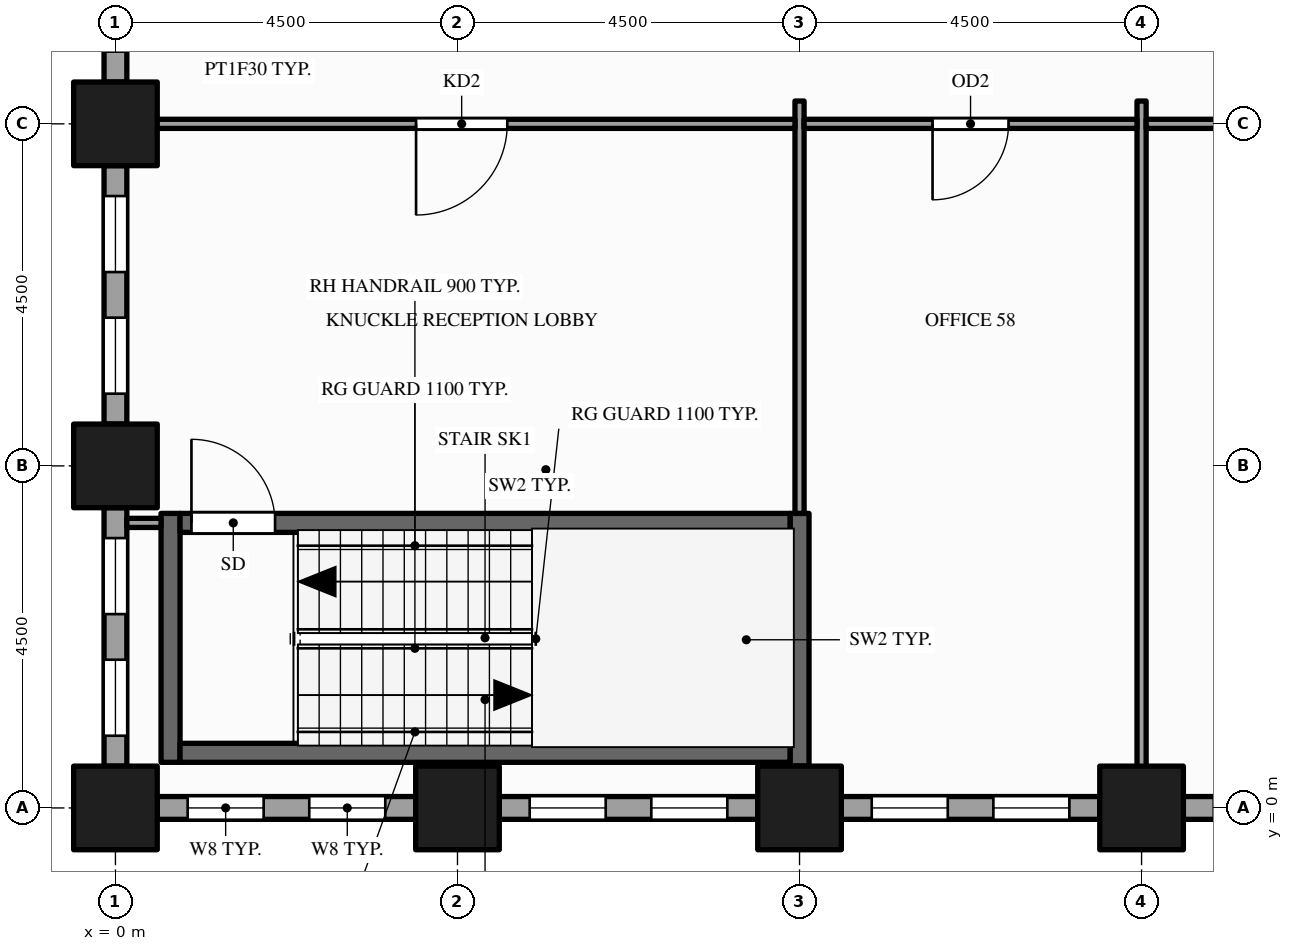
"""IFC4 building model, lengths in metres.
Left out: names, types, materials, properties, quantities, classifications, styles, units other than length and angle.
Written with IfcOpenShell. Run it as: python <this file> out.ifc"""

import sys

from ifc_helpers import new_model, si_unit, direction, frame, frame_2d, origin, origin_2d, place, context, subcontext, project, spatial, rectangle, hollow_rectangle, extrude, element, fill, save


model = new_model("IFC4")
c1 = context("Model", 3, precision=1e-05, world=origin(), true_north=direction((0.0, 1.0)))
c2 = subcontext(c1, "Body", "Model", "MODEL_VIEW")
j1 = project(units=[si_unit("LENGTHUNIT", "METRE"), si_unit("PLANEANGLEUNIT", "RADIAN")], contexts=[c1])
p1 = place(None, origin())
s1 = spatial("IfcSite", under=j1, at=p1, CompositionType="ELEMENT")
p2 = place(p1, origin())
s2 = spatial("IfcBuilding", under=s1, at=p2, CompositionType="ELEMENT")
p3 = place(p2, frame((0.0, 0.0, 29.0)))
s3 = spatial("IfcBuildingStorey", under=s2, at=p3, CompositionType="ELEMENT", Elevation=29.0)
for number, where, z_axis, x_axis in (
    (1, (0.0, 0.0, -0.15), (0.0, 0.0, 1.0), (1.0, 0.0, 0.0)),
    (2, (0.0, 4.5, -0.15), (0.0, 0.0, 1.0), (1.0, 0.0, 0.0)),
    (3, (0.0, 9.0, -0.15), (0.0, 0.0, 1.0), (1.0, 0.0, 0.0)),
    (4, (4.5, 0.0, -0.15), (0.0, 0.0, 1.0), (1.0, 0.0, 0.0)),
    (5, (9.0, 0.0, -0.15), (0.0, 0.0, 1.0), (1.0, 0.0, 0.0)),
    (6, (13.5, 0.0, -0.15), (0.0, 0.0, 1.0), (1.0, 0.0, 0.0)),
):
    element("IfcColumn", number, at=place(p3, frame(where, z_axis=z_axis, x_axis=x_axis)), inside=s3, PredefinedType="COLUMN", context=c2, shape_type="SweptSolid", body=[
        extrude(hollow_rectangle(XDim=1.1, YDim=1.1, WallThickness=0.06, at=origin_2d()), origin(), (0.0, 0.0, 1.0), 4.0),
    ])
p4 = place(p3, frame((0.55, 0.0, 0.0), z_axis=(0.0, 0.0, 1.0), x_axis=(1.0, 0.0, 0.0)))
e7 = element("IfcWall", 7, at=p4, inside=s3, PredefinedType="STANDARD", context=c2, shape_type="SweptSolid", body=[
    extrude(rectangle(XDim=3.4, YDim=0.3, at=frame_2d((1.7, 0.0))), origin(), (0.0, 0.0, 1.0), 3.144),
])
p5 = place(p4, frame((0.4, 0.0, 0.9)))
e8 = element("IfcOpeningElement", 8, at=p5, cuts=e7, PredefinedType="OPENING", context=c2, shape_type="SweptSolid", body=[
    extrude(rectangle(XDim=1.0, YDim=2.0, at=frame_2d((0.5, 1.0))), frame((0.0, 0.16, 0.0), z_axis=(0.0, -1.0, 0.0), x_axis=(1.0, 0.0, 0.0)), (0.0, 0.0, 1.0), 0.32),
])
p6 = place(p4, frame((2.0, 0.0, 0.9)))
e9 = element("IfcOpeningElement", 9, at=p6, cuts=e7, PredefinedType="OPENING", context=c2, shape_type="SweptSolid", body=[
    extrude(rectangle(XDim=1.0, YDim=2.0, at=frame_2d((0.5, 1.0))), frame((0.0, 0.16, 0.0), z_axis=(0.0, -1.0, 0.0), x_axis=(1.0, 0.0, 0.0)), (0.0, 0.0, 1.0), 0.32),
])
p7 = place(p3, frame((5.05, 0.0, 0.0), z_axis=(0.0, 0.0, 1.0), x_axis=(1.0, 0.0, 0.0)))
e10 = element("IfcWall", 10, at=p7, inside=s3, PredefinedType="STANDARD", context=c2, shape_type="SweptSolid", body=[
    extrude(rectangle(XDim=3.4, YDim=0.3, at=frame_2d((1.7, 0.0))), origin(), (0.0, 0.0, 1.0), 3.144),
])
p8 = place(p7, frame((0.4, 0.0, 0.9)))
e11 = element("IfcOpeningElement", 11, at=p8, cuts=e10, PredefinedType="OPENING", context=c2, shape_type="SweptSolid", body=[
    extrude(rectangle(XDim=1.0, YDim=2.0, at=frame_2d((0.5, 1.0))), frame((0.0, 0.16, 0.0), z_axis=(0.0, -1.0, 0.0), x_axis=(1.0, 0.0, 0.0)), (0.0, 0.0, 1.0), 0.32),
])
p9 = place(p7, frame((2.0, 0.0, 0.9)))
e12 = element("IfcOpeningElement", 12, at=p9, cuts=e10, PredefinedType="OPENING", context=c2, shape_type="SweptSolid", body=[
    extrude(rectangle(XDim=1.0, YDim=2.0, at=frame_2d((0.5, 1.0))), frame((0.0, 0.16, 0.0), z_axis=(0.0, -1.0, 0.0), x_axis=(1.0, 0.0, 0.0)), (0.0, 0.0, 1.0), 0.32),
])
p10 = place(p3, frame((9.55, 0.0, 0.0), z_axis=(0.0, 0.0, 1.0), x_axis=(1.0, 0.0, 0.0)))
e13 = element("IfcWall", 13, at=p10, inside=s3, PredefinedType="STANDARD", context=c2, shape_type="SweptSolid", body=[
    extrude(rectangle(XDim=3.4, YDim=0.3, at=frame_2d((1.7, 0.0))), origin(), (0.0, 0.0, 1.0), 3.144),
])
p11 = place(p10, frame((0.4, 0.0, 0.9)))
e14 = element("IfcOpeningElement", 14, at=p11, cuts=e13, PredefinedType="OPENING", context=c2, shape_type="SweptSolid", body=[
    extrude(rectangle(XDim=1.0, YDim=2.0, at=frame_2d((0.5, 1.0))), frame((0.0, 0.16, 0.0), z_axis=(0.0, -1.0, 0.0), x_axis=(1.0, 0.0, 0.0)), (0.0, 0.0, 1.0), 0.32),
])
p12 = place(p10, frame((2.0, 0.0, 0.9)))
e15 = element("IfcOpeningElement", 15, at=p12, cuts=e13, PredefinedType="OPENING", context=c2, shape_type="SweptSolid", body=[
    extrude(rectangle(XDim=1.0, YDim=2.0, at=frame_2d((0.5, 1.0))), frame((0.0, 0.16, 0.0), z_axis=(0.0, -1.0, 0.0), x_axis=(1.0, 0.0, 0.0)), (0.0, 0.0, 1.0), 0.32),
])
p13 = place(p3, frame((14.05, 0.0, 0.0), z_axis=(0.0, 0.0, 1.0), x_axis=(1.0, 0.0, 0.0)))
e16 = element("IfcWall", 16, at=p13, inside=s3, PredefinedType="STANDARD", context=c2, shape_type="SweptSolid", body=[
    extrude(rectangle(XDim=3.4, YDim=0.3, at=frame_2d((1.7, 0.0))), origin(), (0.0, 0.0, 1.0), 3.144),
])
p14 = place(p13, frame((0.4, 0.0, 0.9)))
e17 = element("IfcOpeningElement", 17, at=p14, cuts=e16, PredefinedType="OPENING", context=c2, shape_type="SweptSolid", body=[
    extrude(rectangle(XDim=1.0, YDim=2.0, at=frame_2d((0.5, 1.0))), frame((0.0, 0.16, 0.0), z_axis=(0.0, -1.0, 0.0), x_axis=(1.0, 0.0, 0.0)), (0.0, 0.0, 1.0), 0.32),
])
p15 = place(p13, frame((2.0, 0.0, 0.9)))
e18 = element("IfcOpeningElement", 18, at=p15, cuts=e16, PredefinedType="OPENING", context=c2, shape_type="SweptSolid", body=[
    extrude(rectangle(XDim=1.0, YDim=2.0, at=frame_2d((0.5, 1.0))), frame((0.0, 0.16, 0.0), z_axis=(0.0, -1.0, 0.0), x_axis=(1.0, 0.0, 0.0)), (0.0, 0.0, 1.0), 0.32),
])
p16 = place(p3, frame((0.0, 12.95, 0.0), z_axis=(0.0, 0.0, 1.0), x_axis=(0.0, -1.0, 0.0)))
e19 = element("IfcWall", 19, at=p16, inside=s3, PredefinedType="STANDARD", context=c2, shape_type="SweptSolid", body=[
    extrude(rectangle(XDim=3.4, YDim=0.3, at=frame_2d((1.7, 0.0))), origin(), (0.0, 0.0, 1.0), 3.144),
])
p17 = place(p16, frame((0.4, 0.0, 0.9)))
e20 = element("IfcOpeningElement", 20, at=p17, cuts=e19, PredefinedType="OPENING", context=c2, shape_type="SweptSolid", body=[
    extrude(rectangle(XDim=1.0, YDim=2.0, at=frame_2d((0.5, 1.0))), frame((0.0, 0.16, 0.0), z_axis=(0.0, -1.0, 0.0), x_axis=(1.0, 0.0, 0.0)), (0.0, 0.0, 1.0), 0.32),
])
p18 = place(p16, frame((2.0, 0.0, 0.9)))
e21 = element("IfcOpeningElement", 21, at=p18, cuts=e19, PredefinedType="OPENING", context=c2, shape_type="SweptSolid", body=[
    extrude(rectangle(XDim=1.0, YDim=2.0, at=frame_2d((0.5, 1.0))), frame((0.0, 0.16, 0.0), z_axis=(0.0, -1.0, 0.0), x_axis=(1.0, 0.0, 0.0)), (0.0, 0.0, 1.0), 0.32),
])
p19 = place(p3, frame((0.0, 8.45, 0.0), z_axis=(0.0, 0.0, 1.0), x_axis=(0.0, -1.0, 0.0)))
e22 = element("IfcWall", 22, at=p19, inside=s3, PredefinedType="STANDARD", context=c2, shape_type="SweptSolid", body=[
    extrude(rectangle(XDim=3.4, YDim=0.3, at=frame_2d((1.7, 0.0))), origin(), (0.0, 0.0, 1.0), 3.144),
])
p20 = place(p19, frame((0.4, 0.0, 0.9)))
e23 = element("IfcOpeningElement", 23, at=p20, cuts=e22, PredefinedType="OPENING", context=c2, shape_type="SweptSolid", body=[
    extrude(rectangle(XDim=1.0, YDim=2.0, at=frame_2d((0.5, 1.0))), frame((0.0, 0.16, 0.0), z_axis=(0.0, -1.0, 0.0), x_axis=(1.0, 0.0, 0.0)), (0.0, 0.0, 1.0), 0.32),
])
p21 = place(p19, frame((2.0, 0.0, 0.9)))
e24 = element("IfcOpeningElement", 24, at=p21, cuts=e22, PredefinedType="OPENING", context=c2, shape_type="SweptSolid", body=[
    extrude(rectangle(XDim=1.0, YDim=2.0, at=frame_2d((0.5, 1.0))), frame((0.0, 0.16, 0.0), z_axis=(0.0, -1.0, 0.0), x_axis=(1.0, 0.0, 0.0)), (0.0, 0.0, 1.0), 0.32),
])
p22 = place(p3, frame((0.0, 3.95, 0.0), z_axis=(0.0, 0.0, 1.0), x_axis=(0.0, -1.0, 0.0)))
e25 = element("IfcWall", 25, at=p22, inside=s3, PredefinedType="STANDARD", context=c2, shape_type="SweptSolid", body=[
    extrude(rectangle(XDim=3.4, YDim=0.3, at=frame_2d((1.7, 0.0))), origin(), (0.0, 0.0, 1.0), 3.144),
])
p23 = place(p22, frame((0.4, 0.0, 0.9)))
e26 = element("IfcOpeningElement", 26, at=p23, cuts=e25, PredefinedType="OPENING", context=c2, shape_type="SweptSolid", body=[
    extrude(rectangle(XDim=1.0, YDim=2.0, at=frame_2d((0.5, 1.0))), frame((0.0, 0.16, 0.0), z_axis=(0.0, -1.0, 0.0), x_axis=(1.0, 0.0, 0.0)), (0.0, 0.0, 1.0), 0.32),
])
p24 = place(p22, frame((2.0, 0.0, 0.9)))
e27 = element("IfcOpeningElement", 27, at=p24, cuts=e25, PredefinedType="OPENING", context=c2, shape_type="SweptSolid", body=[
    extrude(rectangle(XDim=1.0, YDim=2.0, at=frame_2d((0.5, 1.0))), frame((0.0, 0.16, 0.0), z_axis=(0.0, -1.0, 0.0), x_axis=(1.0, 0.0, 0.0)), (0.0, 0.0, 1.0), 0.32),
])
p25 = place(p3, frame((0.725, 0.6, 0.0), z_axis=(0.0, 0.0, 1.0), x_axis=(0.0, 1.0, 0.0)))
e28 = element("IfcWall", 28, at=p25, inside=s3, PredefinedType="SHEAR", context=c2, shape_type="SweptSolid", body=[
    extrude(rectangle(XDim=3.275, YDim=0.25, at=frame_2d((1.637, 0.0))), origin(), (0.0, 0.0, 1.0), 3.85),
])
p26 = place(p3, frame((9.0, 0.15, 0.0), z_axis=(0.0, 0.0, 1.0), x_axis=(0.0, 1.0, 0.0)))
e29 = element("IfcWall", 29, at=p26, inside=s3, PredefinedType="PARTITIONING", context=c2, shape_type="SweptSolid", body=[
    extrude(rectangle(XDim=0.4, YDim=0.12, at=frame_2d((0.2, 0.0))), origin(), (0.0, 0.0, 1.0), 3.85),
])
p27 = place(p3, frame((9.0, 0.55, 0.0), z_axis=(0.0, 0.0, 1.0), x_axis=(0.0, 1.0, 0.0)))
e30 = element("IfcWall", 30, at=p27, inside=s3, PredefinedType="SHEAR", context=c2, shape_type="SweptSolid", body=[
    extrude(rectangle(XDim=3.325, YDim=0.25, at=frame_2d((1.663, 0.0))), origin(), (0.0, 0.0, 1.0), 3.85),
])
p28 = place(p3, frame((9.0, 3.875, 0.0), z_axis=(0.0, 0.0, 1.0), x_axis=(0.0, 1.0, 0.0)))
e31 = element("IfcWall", 31, at=p28, inside=s3, PredefinedType="PARTITIONING", context=c2, shape_type="SweptSolid", body=[
    extrude(rectangle(XDim=5.425, YDim=0.12, at=frame_2d((2.712, 0.0))), origin(), (0.0, 0.0, 1.0), 2.938),
])
p29 = place(p3, frame((13.5, 0.15, 0.0), z_axis=(0.0, 0.0, 1.0), x_axis=(0.0, 1.0, 0.0)))
e32 = element("IfcWall", 32, at=p29, inside=s3, PredefinedType="PARTITIONING", context=c2, shape_type="SweptSolid", body=[
    extrude(rectangle(XDim=9.15, YDim=0.12, at=frame_2d((4.575, 0.0))), origin(), (0.0, 0.0, 1.0), 2.938),
])
p30 = place(p3, frame((0.85, 0.725, 0.0), z_axis=(0.0, 0.0, 1.0), x_axis=(1.0, 0.0, 0.0)))
e33 = element("IfcWall", 33, at=p30, inside=s3, PredefinedType="SHEAR", context=c2, shape_type="SweptSolid", body=[
    extrude(rectangle(XDim=8.025, YDim=0.25, at=frame_2d((4.012, 0.0))), origin(), (0.0, 0.0, 1.0), 3.85),
])
p31 = place(p3, frame((0.15, 3.75, 0.0), z_axis=(0.0, 0.0, 1.0), x_axis=(1.0, 0.0, 0.0)))
e34 = element("IfcWall", 34, at=p31, inside=s3, PredefinedType="PARTITIONING", context=c2, shape_type="SweptSolid", body=[
    extrude(rectangle(XDim=0.45, YDim=0.12, at=frame_2d((0.225, 0.0))), origin(), (0.0, 0.0, 1.0), 3.144),
])
p32 = place(p3, frame((0.85, 3.75, 0.0), z_axis=(0.0, 0.0, 1.0), x_axis=(1.0, 0.0, 0.0)))
e35 = element("IfcWall", 35, at=p32, inside=s3, PredefinedType="SHEAR", context=c2, shape_type="SweptSolid", body=[
    extrude(rectangle(XDim=8.025, YDim=0.25, at=frame_2d((4.012, 0.0))), origin(), (0.0, 0.0, 1.0), 3.85),
])
p33 = place(p32, frame((0.15, 0.0, 0.0)))
e36 = element("IfcOpeningElement", 36, at=p33, cuts=e35, PredefinedType="OPENING", context=c2, shape_type="SweptSolid", body=[
    extrude(rectangle(XDim=1.1, YDim=2.1, at=frame_2d((0.55, 1.05))), frame((0.0, 0.135, 0.0), z_axis=(0.0, -1.0, 0.0), x_axis=(1.0, 0.0, 0.0)), (0.0, 0.0, 1.0), 0.27),
])
p34 = place(p3, frame((0.15, 9.0, 0.0), z_axis=(0.0, 0.0, 1.0), x_axis=(1.0, 0.0, 0.0)))
e37 = element("IfcWall", 37, at=p34, inside=s3, PredefinedType="PARTITIONING", context=c2, shape_type="SweptSolid", body=[
    extrude(rectangle(XDim=8.79, YDim=0.12, at=frame_2d((4.395, 0.0))), origin(), (0.0, 0.0, 1.0), 2.938),
])
p35 = place(p34, frame((3.805, 0.0, 0.0)))
e38 = element("IfcOpeningElement", 38, at=p35, cuts=e37, PredefinedType="OPENING", context=c2, shape_type="SweptSolid", body=[
    extrude(rectangle(XDim=1.2, YDim=2.1, at=frame_2d((0.6, 1.05))), frame((0.0, 0.07, 0.0), z_axis=(0.0, -1.0, 0.0), x_axis=(1.0, 0.0, 0.0)), (0.0, 0.0, 1.0), 0.14),
])
p36 = place(p3, frame((9.06, 9.0, 0.0), z_axis=(0.0, 0.0, 1.0), x_axis=(1.0, 0.0, 0.0)))
e39 = element("IfcWall", 39, at=p36, inside=s3, PredefinedType="PARTITIONING", context=c2, shape_type="SweptSolid", body=[
    extrude(rectangle(XDim=4.38, YDim=0.12, at=frame_2d((2.19, 0.0))), origin(), (0.0, 0.0, 1.0), 2.938),
])
p37 = place(p36, frame((1.69, 0.0, 0.0)))
e40 = element("IfcOpeningElement", 40, at=p37, cuts=e39, PredefinedType="OPENING", context=c2, shape_type="SweptSolid", body=[
    extrude(rectangle(XDim=1.0, YDim=2.1, at=frame_2d((0.5, 1.05))), frame((0.0, 0.07, 0.0), z_axis=(0.0, -1.0, 0.0), x_axis=(1.0, 0.0, 0.0)), (0.0, 0.0, 1.0), 0.14),
])
p38 = place(p3, frame((13.56, 9.0, 0.0), z_axis=(0.0, 0.0, 1.0), x_axis=(1.0, 0.0, 0.0)))
e41 = element("IfcWall", 41, at=p38, inside=s3, PredefinedType="PARTITIONING", context=c2, shape_type="SweptSolid", body=[
    extrude(rectangle(XDim=6.63, YDim=0.12, at=frame_2d((3.315, 0.0))), origin(), (0.0, 0.0, 1.0), 2.938),
])
p39 = place(p38, frame((2.865, 0.0, 0.0)))
e42 = element("IfcOpeningElement", 42, at=p39, cuts=e41, PredefinedType="OPENING", context=c2, shape_type="SweptSolid", body=[
    extrude(rectangle(XDim=0.9, YDim=2.1, at=frame_2d((0.45, 1.05))), frame((0.0, 0.07, 0.0), z_axis=(0.0, -1.0, 0.0), x_axis=(1.0, 0.0, 0.0)), (0.0, 0.0, 1.0), 0.14),
])
p40 = place(p5, origin())
e43 = element("IfcWindow", 43, at=p40, inside=s3, PartitioningType="SINGLE_PANEL", PredefinedType="WINDOW", context=c2, shape_type="SweptSolid", body=[
    extrude(rectangle(XDim=1.0, YDim=2.0, at=frame_2d((0.5, 1.0))), frame((0.0, 0.03, 0.0), z_axis=(0.0, -1.0, 0.0), x_axis=(1.0, 0.0, 0.0)), (0.0, 0.0, 1.0), 0.06),
])
fill(e8, e43)
p41 = place(p6, origin())
e44 = element("IfcWindow", 44, at=p41, inside=s3, PartitioningType="SINGLE_PANEL", PredefinedType="WINDOW", context=c2, shape_type="SweptSolid", body=[
    extrude(rectangle(XDim=1.0, YDim=2.0, at=frame_2d((0.5, 1.0))), frame((0.0, 0.03, 0.0), z_axis=(0.0, -1.0, 0.0), x_axis=(1.0, 0.0, 0.0)), (0.0, 0.0, 1.0), 0.06),
])
fill(e9, e44)
p42 = place(p8, origin())
e45 = element("IfcWindow", 45, at=p42, inside=s3, PartitioningType="SINGLE_PANEL", PredefinedType="WINDOW", context=c2, shape_type="SweptSolid", body=[
    extrude(rectangle(XDim=1.0, YDim=2.0, at=frame_2d((0.5, 1.0))), frame((0.0, 0.03, 0.0), z_axis=(0.0, -1.0, 0.0), x_axis=(1.0, 0.0, 0.0)), (0.0, 0.0, 1.0), 0.06),
])
fill(e11, e45)
p43 = place(p9, origin())
e46 = element("IfcWindow", 46, at=p43, inside=s3, PartitioningType="SINGLE_PANEL", PredefinedType="WINDOW", context=c2, shape_type="SweptSolid", body=[
    extrude(rectangle(XDim=1.0, YDim=2.0, at=frame_2d((0.5, 1.0))), frame((0.0, 0.03, 0.0), z_axis=(0.0, -1.0, 0.0), x_axis=(1.0, 0.0, 0.0)), (0.0, 0.0, 1.0), 0.06),
])
fill(e12, e46)
p44 = place(p11, origin())
e47 = element("IfcWindow", 47, at=p44, inside=s3, PartitioningType="SINGLE_PANEL", PredefinedType="WINDOW", context=c2, shape_type="SweptSolid", body=[
    extrude(rectangle(XDim=1.0, YDim=2.0, at=frame_2d((0.5, 1.0))), frame((0.0, 0.03, 0.0), z_axis=(0.0, -1.0, 0.0), x_axis=(1.0, 0.0, 0.0)), (0.0, 0.0, 1.0), 0.06),
])
fill(e14, e47)
p45 = place(p12, origin())
e48 = element("IfcWindow", 48, at=p45, inside=s3, PartitioningType="SINGLE_PANEL", PredefinedType="WINDOW", context=c2, shape_type="SweptSolid", body=[
    extrude(rectangle(XDim=1.0, YDim=2.0, at=frame_2d((0.5, 1.0))), frame((0.0, 0.03, 0.0), z_axis=(0.0, -1.0, 0.0), x_axis=(1.0, 0.0, 0.0)), (0.0, 0.0, 1.0), 0.06),
])
fill(e15, e48)
p46 = place(p20, origin())
e49 = element("IfcWindow", 49, at=p46, inside=s3, PartitioningType="SINGLE_PANEL", PredefinedType="WINDOW", context=c2, shape_type="SweptSolid", body=[
    extrude(rectangle(XDim=1.0, YDim=2.0, at=frame_2d((0.5, 1.0))), frame((0.0, 0.03, 0.0), z_axis=(0.0, -1.0, 0.0), x_axis=(1.0, 0.0, 0.0)), (0.0, 0.0, 1.0), 0.06),
])
fill(e23, e49)
p47 = place(p21, origin())
e50 = element("IfcWindow", 50, at=p47, inside=s3, PartitioningType="SINGLE_PANEL", PredefinedType="WINDOW", context=c2, shape_type="SweptSolid", body=[
    extrude(rectangle(XDim=1.0, YDim=2.0, at=frame_2d((0.5, 1.0))), frame((0.0, 0.03, 0.0), z_axis=(0.0, -1.0, 0.0), x_axis=(1.0, 0.0, 0.0)), (0.0, 0.0, 1.0), 0.06),
])
fill(e24, e50)
p48 = place(p23, origin())
e51 = element("IfcWindow", 51, at=p48, inside=s3, PartitioningType="SINGLE_PANEL", PredefinedType="WINDOW", context=c2, shape_type="SweptSolid", body=[
    extrude(rectangle(XDim=1.0, YDim=2.0, at=frame_2d((0.5, 1.0))), frame((0.0, 0.03, 0.0), z_axis=(0.0, -1.0, 0.0), x_axis=(1.0, 0.0, 0.0)), (0.0, 0.0, 1.0), 0.06),
])
fill(e26, e51)
p49 = place(p24, origin())
e52 = element("IfcWindow", 52, at=p49, inside=s3, PartitioningType="SINGLE_PANEL", PredefinedType="WINDOW", context=c2, shape_type="SweptSolid", body=[
    extrude(rectangle(XDim=1.0, YDim=2.0, at=frame_2d((0.5, 1.0))), frame((0.0, 0.03, 0.0), z_axis=(0.0, -1.0, 0.0), x_axis=(1.0, 0.0, 0.0)), (0.0, 0.0, 1.0), 0.06),
])
fill(e27, e52)
p50 = place(p33, origin())
e53 = element("IfcDoor", 53, at=p50, inside=s3, OperationType="SINGLE_SWING_LEFT", PredefinedType="DOOR", context=c2, shape_type="SweptSolid", body=[
    extrude(rectangle(XDim=1.1, YDim=2.1, at=frame_2d((0.55, 1.05))), frame((0.0, 0.025, 0.0), z_axis=(0.0, -1.0, 0.0), x_axis=(1.0, 0.0, 0.0)), (0.0, 0.0, 1.0), 0.05),
])
fill(e36, e53)
p51 = place(p35, origin())
e54 = element("IfcDoor", 54, at=p51, inside=s3, OperationType="SINGLE_SWING_LEFT", PredefinedType="DOOR", context=c2, shape_type="SweptSolid", body=[
    extrude(rectangle(XDim=1.2, YDim=2.1, at=frame_2d((0.6, 1.05))), frame((0.0, 0.025, 0.0), z_axis=(0.0, -1.0, 0.0), x_axis=(1.0, 0.0, 0.0)), (0.0, 0.0, 1.0), 0.05),
])
fill(e38, e54)
p52 = place(p37, origin())
e55 = element("IfcDoor", 55, at=p52, inside=s3, OperationType="SINGLE_SWING_LEFT", PredefinedType="DOOR", context=c2, shape_type="SweptSolid", body=[
    extrude(rectangle(XDim=1.0, YDim=2.1, at=frame_2d((0.5, 1.05))), frame((0.0, 0.025, 0.0), z_axis=(0.0, -1.0, 0.0), x_axis=(1.0, 0.0, 0.0)), (0.0, 0.0, 1.0), 0.05),
])
fill(e40, e55)
save(model, sys.argv[1])
